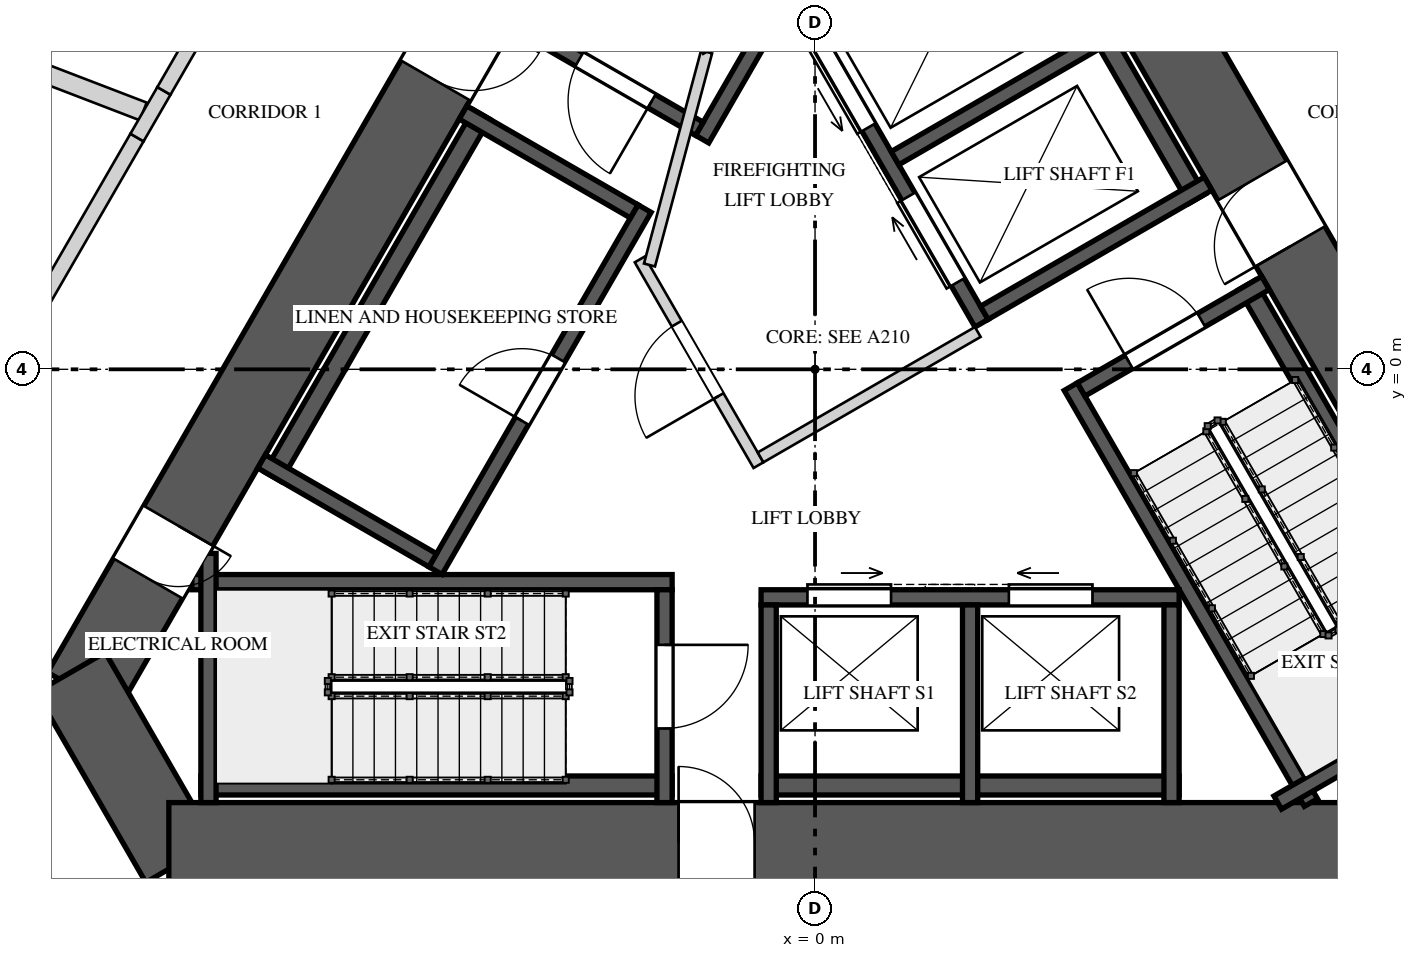
"""IFC4 building model, lengths in metres.
Left out: names, types, materials, properties, quantities, classifications, styles, units other than length and angle.
Written with IfcOpenShell. Run it as: python <this file> out.ifc"""

import sys

from ifc_helpers import new_model, si_unit, direction, frame, frame_2d, origin, place, context, subcontext, project, spatial, rectangle, extrude, element, fill, save


model = new_model("IFC4")
c1 = context("Model", 3, precision=1e-05, world=origin(), true_north=direction((0.0, 1.0)))
c2 = subcontext(c1, "Body", "Model", "MODEL_VIEW")
j1 = project(units=[si_unit("LENGTHUNIT", "METRE"), si_unit("PLANEANGLEUNIT", "RADIAN")], contexts=[c1])
p1 = place(None, origin())
s1 = spatial("IfcSite", under=j1, at=p1, CompositionType="ELEMENT")
p2 = place(p1, origin())
s2 = spatial("IfcBuilding", under=s1, at=p2, CompositionType="ELEMENT")
p3 = place(p2, frame((0.0, 0.0, 51.2)))
s3 = spatial("IfcBuildingStorey", under=s2, at=p3, CompositionType="ELEMENT", Elevation=51.2)
p4 = place(p3, frame((-1.14, 10.475, 0.0), z_axis=(0.0, 0.0, 1.0), x_axis=(-0.499985955615, -0.866033512162, 0.0)))
e1 = element("IfcWall", 1, at=p4, inside=s3, PredefinedType="SHEAR", context=c2, shape_type="SweptSolid", body=[
    extrude(rectangle(XDim=17.003, YDim=1.05, at=frame_2d((8.501, 0.0))), origin(), (0.0, 0.0, 1.0), 4.0),
])
p5 = place(p4, frame((6.707, 0.0, 0.0)))
e2 = element("IfcOpeningElement", 2, at=p5, cuts=e1, PredefinedType="OPENING", context=c2, shape_type="SweptSolid", body=[
    extrude(rectangle(XDim=1.0, YDim=2.4, at=frame_2d((0.5, 1.2))), frame((0.0, 0.535, 0.0), z_axis=(0.0, -1.0, 0.0), x_axis=(1.0, 0.0, 0.0)), (0.0, 0.0, 1.0), 1.07),
])
p6 = place(p4, frame((14.472, 0.0, 0.0)))
e3 = element("IfcOpeningElement", 3, at=p6, cuts=e1, PredefinedType="OPENING", context=c2, shape_type="SweptSolid", body=[
    extrude(rectangle(XDim=0.8, YDim=2.1, at=frame_2d((0.4, 1.05))), frame((0.0, 0.535, 0.0), z_axis=(0.0, -1.0, 0.0), x_axis=(1.0, 0.0, 0.0)), (0.0, 0.0, 1.0), 1.07),
])
p7 = place(p3, frame((-9.793, -3.988, 0.0), z_axis=(0.0, 0.0, 1.0), x_axis=(0.499995765644, -0.866027848477, 0.0)))
e4 = element("IfcWall", 4, at=p7, inside=s3, PredefinedType="SHEAR", context=c2, shape_type="SweptSolid", body=[
    extrude(rectangle(XDim=2.887, YDim=1.05, at=frame_2d((1.443, 0.0))), origin(), (0.0, 0.0, 1.0), 4.0),
])
p8 = place(p3, frame((-8.501, -6.225, 0.0), z_axis=(0.0, 0.0, 1.0), x_axis=(1.0, 0.0, 0.0)))
e5 = element("IfcWall", 5, at=p8, inside=s3, PredefinedType="SHEAR", context=c2, shape_type="SweptSolid", body=[
    extrude(rectangle(XDim=17.003, YDim=1.05, at=frame_2d((8.501, 0.0))), origin(), (0.0, 0.0, 1.0), 4.0),
])
p9 = place(p8, frame((6.707, 0.0, 0.0)))
e6 = element("IfcOpeningElement", 6, at=p9, cuts=e5, PredefinedType="OPENING", context=c2, shape_type="SweptSolid", body=[
    extrude(rectangle(XDim=1.0, YDim=2.4, at=frame_2d((0.5, 1.2))), frame((0.0, 0.535, 0.0), z_axis=(0.0, -1.0, 0.0), x_axis=(1.0, 0.0, 0.0)), (0.0, 0.0, 1.0), 1.07),
])
p10 = place(p3, frame((9.642, -4.25, 0.0), z_axis=(0.0, 0.0, 1.0), x_axis=(-0.499985955615, 0.866033512162, 0.0)))
e7 = element("IfcWall", 7, at=p10, inside=s3, PredefinedType="SHEAR", context=c2, shape_type="SweptSolid", body=[
    extrude(rectangle(XDim=17.003, YDim=1.05, at=frame_2d((8.501, 0.0))), origin(), (0.0, 0.0, 1.0), 4.0),
])
p11 = place(p10, frame((6.776, 0.0, 0.0)))
e8 = element("IfcOpeningElement", 8, at=p11, cuts=e7, PredefinedType="OPENING", context=c2, shape_type="SweptSolid", body=[
    extrude(rectangle(XDim=1.0, YDim=2.4, at=frame_2d((0.5, 1.2))), frame((0.0, 0.535, 0.0), z_axis=(0.0, -1.0, 0.0), x_axis=(1.0, 0.0, 0.0)), (0.0, 0.0, 1.0), 1.07),
])
p12 = place(p3, frame((1.674, 8.5, 0.0), z_axis=(0.0, 0.0, 1.0), x_axis=(-0.499995607161, -0.866027939976, 0.0)))
e9 = element("IfcWall", 9, at=p12, inside=s3, PredefinedType="SOLIDWALL", context=c2, shape_type="SweptSolid", body=[
    extrude(rectangle(XDim=6.318, YDim=0.2, at=frame_2d((3.159, 0.0))), origin(), (0.0, 0.0, 1.0), 3.65),
])
p13 = place(p3, frame((-1.521, 3.165, 0.0), z_axis=(0.0, 0.0, 1.0), x_axis=(-0.866034573852, 0.49998411664, 0.0)))
e10 = element("IfcWall", 10, at=p13, inside=s3, PredefinedType="SOLIDWALL", context=c2, shape_type="SweptSolid", body=[
    extrude(rectangle(XDim=2.8, YDim=0.2, at=frame_2d((1.4, 0.0))), origin(), (0.0, 0.0, 1.0), 3.65),
])
p14 = place(p13, frame((0.725, 0.0, 0.0)))
e11 = element("IfcOpeningElement", 11, at=p14, cuts=e10, PredefinedType="OPENING", context=c2, shape_type="SweptSolid", body=[
    extrude(rectangle(XDim=1.1, YDim=2.4, at=frame_2d((0.55, 1.2))), frame((0.0, 0.11, 0.0), z_axis=(0.0, -1.0, 0.0), x_axis=(1.0, 0.0, 0.0)), (0.0, 0.0, 1.0), 0.22),
])
p15 = place(p3, frame((-8.08, -5.475, 0.0), z_axis=(0.0, 0.0, 1.0), x_axis=(1.0, 0.0, 0.0)))
e12 = element("IfcWall", 12, at=p15, inside=s3, PredefinedType="SOLIDWALL", context=c2, shape_type="SweptSolid", body=[
    extrude(rectangle(XDim=6.2, YDim=0.25, at=frame_2d((3.1, 0.0))), origin(), (0.0, 0.0, 1.0), 3.65),
])
p16 = place(p3, frame((-8.198, -2.8, 0.0), z_axis=(0.0, 0.0, 1.0), x_axis=(1.0, 0.0, 0.0)))
e13 = element("IfcWall", 13, at=p16, inside=s3, PredefinedType="SOLIDWALL", context=c2, shape_type="SweptSolid", body=[
    extrude(rectangle(XDim=6.319, YDim=0.2, at=frame_2d((3.159, 0.0))), origin(), (0.0, 0.0, 1.0), 3.65),
])
p17 = place(p3, frame((-7.98, -2.422, 0.0), z_axis=(0.0, 0.0, 1.0), x_axis=(0.0, -1.0, 0.0)))
e14 = element("IfcWall", 14, at=p17, inside=s3, PredefinedType="SOLIDWALL", context=c2, shape_type="SweptSolid", body=[
    extrude(rectangle(XDim=3.278, YDim=0.2, at=frame_2d((1.639, 0.0))), origin(), (0.0, 0.0, 1.0), 3.65),
])
p18 = place(p3, frame((-1.98, -2.9, 0.0), z_axis=(0.0, 0.0, 1.0), x_axis=(0.0, -1.0, 0.0)))
e15 = element("IfcWall", 15, at=p18, inside=s3, PredefinedType="SOLIDWALL", context=c2, shape_type="SweptSolid", body=[
    extrude(rectangle(XDim=2.8, YDim=0.2, at=frame_2d((1.4, 0.0))), origin(), (0.0, 0.0, 1.0), 3.65),
])
p19 = place(p18, frame((0.725, 0.0, 0.0)))
e16 = element("IfcOpeningElement", 16, at=p19, cuts=e15, PredefinedType="OPENING", context=c2, shape_type="SweptSolid", body=[
    extrude(rectangle(XDim=1.1, YDim=2.4, at=frame_2d((0.55, 1.2))), frame((0.0, 0.11, 0.0), z_axis=(0.0, -1.0, 0.0), x_axis=(1.0, 0.0, 0.0)), (0.0, 0.0, 1.0), 0.22),
])
p20 = place(p3, frame((8.781, -4.26, 0.0), z_axis=(0.0, 0.0, 1.0), x_axis=(-0.500009909098, 0.866019682689, 0.0)))
e17 = element("IfcWall", 17, at=p20, inside=s3, PredefinedType="SOLIDWALL", context=c2, shape_type="SweptSolid", body=[
    extrude(rectangle(XDim=6.2, YDim=0.25, at=frame_2d((3.1, 0.0))), origin(), (0.0, 0.0, 1.0), 3.65),
])
p21 = place(p3, frame((6.524, -5.7, 0.0), z_axis=(0.0, 0.0, 1.0), x_axis=(-0.499995607161, 0.866027939976, 0.0)))
e18 = element("IfcWall", 18, at=p21, inside=s3, PredefinedType="SOLIDWALL", context=c2, shape_type="SweptSolid", body=[
    extrude(rectangle(XDim=6.318, YDim=0.2, at=frame_2d((3.159, 0.0))), origin(), (0.0, 0.0, 1.0), 3.65),
])
p22 = place(p3, frame((6.087, -5.7, 0.0), z_axis=(0.0, 0.0, 1.0), x_axis=(0.866006986733, 0.500031897912, 0.0)))
e19 = element("IfcWall", 19, at=p22, inside=s3, PredefinedType="SOLIDWALL", context=c2, shape_type="SweptSolid", body=[
    extrude(rectangle(XDim=3.278, YDim=0.2, at=frame_2d((1.639, 0.0))), origin(), (0.0, 0.0, 1.0), 3.65),
])
p23 = place(p3, frame((3.501, -0.265, 0.0), z_axis=(0.0, 0.0, 1.0), x_axis=(0.866034573852, 0.49998411664, 0.0)))
e20 = element("IfcWall", 20, at=p23, inside=s3, PredefinedType="SOLIDWALL", context=c2, shape_type="SweptSolid", body=[
    extrude(rectangle(XDim=2.8, YDim=0.2, at=frame_2d((1.4, 0.0))), origin(), (0.0, 0.0, 1.0), 3.65),
])
p24 = place(p23, frame((0.725, 0.0, 0.0)))
e21 = element("IfcOpeningElement", 21, at=p24, cuts=e20, PredefinedType="OPENING", context=c2, shape_type="SweptSolid", body=[
    extrude(rectangle(XDim=1.1, YDim=2.4, at=frame_2d((0.55, 1.2))), frame((0.0, 0.11, 0.0), z_axis=(0.0, -1.0, 0.0), x_axis=(1.0, 0.0, 0.0)), (0.0, 0.0, 1.0), 0.22),
])
p25 = place(p3, frame((-4.993, -2.648, 0.0), z_axis=(0.0, 0.0, 1.0), x_axis=(0.499996545922, 0.866027397988, 0.0)))
e22 = element("IfcWall", 22, at=p25, inside=s3, PredefinedType="SOLIDWALL", context=c2, shape_type="SweptSolid", body=[
    extrude(rectangle(XDim=5.5, YDim=0.2, at=frame_2d((2.75, 0.0))), origin(), (0.0, 0.0, 1.0), 3.65),
])
p26 = place(p25, frame((2.275, 0.0, 0.0)))
e23 = element("IfcOpeningElement", 23, at=p26, cuts=e22, PredefinedType="OPENING", context=c2, shape_type="SweptSolid", body=[
    extrude(rectangle(XDim=0.95, YDim=2.4, at=frame_2d((0.475, 1.2))), frame((0.0, 0.11, 0.0), z_axis=(0.0, -1.0, 0.0), x_axis=(1.0, 0.0, 0.0)), (0.0, 0.0, 1.0), 0.22),
])
p27 = place(p3, frame((-4.386, 3.352, 0.0), z_axis=(0.0, 0.0, 1.0), x_axis=(-0.500015767406, -0.866016300277, 0.0)))
e24 = element("IfcWall", 24, at=p27, inside=s3, PredefinedType="SOLIDWALL", context=c2, shape_type="SweptSolid", body=[
    extrude(rectangle(XDim=5.5, YDim=0.25, at=frame_2d((2.75, 0.0))), origin(), (0.0, 0.0, 1.0), 3.65),
])
for number, where, z_axis, x_axis in (
    (25, (-2.38, 2.078, 0.0), (0.0, 0.0, 1.0), (-0.866, 0.5, 0.0)),
    (26, (-5.03, -2.512, 0.0), (0.0, 0.0, 1.0), (-0.866, 0.5, 0.0)),
):
    element("IfcWall", number, at=place(p3, frame(where, z_axis=z_axis, x_axis=x_axis)), inside=s3, PredefinedType="SOLIDWALL", context=c2, shape_type="SweptSolid", body=[
        extrude(rectangle(XDim=2.6, YDim=0.2, at=frame_2d((1.3, 0.0))), origin(), (0.0, 0.0, 1.0), 3.65),
    ])
p28 = place(p3, frame((-0.71, -3.0, 0.0), z_axis=(0.0, 0.0, 1.0), x_axis=(1.0, 0.0, 0.0)))
e27 = element("IfcWall", 27, at=p28, inside=s3, PredefinedType="SOLIDWALL", context=c2, shape_type="SweptSolid", body=[
    extrude(rectangle(XDim=5.5, YDim=0.2, at=frame_2d((2.75, 0.0))), origin(), (0.0, 0.0, 1.0), 3.65),
])
p29 = place(p28, frame((0.61, 0.0, 0.0)))
e28 = element("IfcOpeningElement", 28, at=p29, cuts=e27, PredefinedType="OPENING", context=c2, shape_type="SweptSolid", body=[
    extrude(rectangle(XDim=1.1, YDim=2.1, at=frame_2d((0.55, 1.05))), frame((0.0, 0.11, 0.0), z_axis=(0.0, -1.0, 0.0), x_axis=(1.0, 0.0, 0.0)), (0.0, 0.0, 1.0), 0.22),
])
p30 = place(p28, frame((3.26, 0.0, 0.0)))
e29 = element("IfcOpeningElement", 29, at=p30, cuts=e27, PredefinedType="OPENING", context=c2, shape_type="SweptSolid", body=[
    extrude(rectangle(XDim=1.1, YDim=2.1, at=frame_2d((0.55, 1.05))), frame((0.0, 0.11, 0.0), z_axis=(0.0, -1.0, 0.0), x_axis=(1.0, 0.0, 0.0)), (0.0, 0.0, 1.0), 0.22),
])
p31 = place(p3, frame((-0.71, -5.475, 0.0), z_axis=(0.0, 0.0, 1.0), x_axis=(1.0, 0.0, 0.0)))
e30 = element("IfcWall", 30, at=p31, inside=s3, PredefinedType="SOLIDWALL", context=c2, shape_type="SweptSolid", body=[
    extrude(rectangle(XDim=5.5, YDim=0.25, at=frame_2d((2.75, 0.0))), origin(), (0.0, 0.0, 1.0), 3.65),
])
for number, where, z_axis, x_axis in (
    (31, (-0.61, -3.1, 0.0), (0.0, 0.0, 1.0), (0.0, -1.0, 0.0)),
    (32, (2.04, -3.1, 0.0), (0.0, 0.0, 1.0), (0.0, -1.0, 0.0)),
    (33, (4.69, -3.1, 0.0), (0.0, 0.0, 1.0), (0.0, -1.0, 0.0)),
):
    element("IfcWall", number, at=place(p3, frame(where, z_axis=z_axis, x_axis=x_axis)), inside=s3, PredefinedType="SOLIDWALL", context=c2, shape_type="SweptSolid", body=[
        extrude(rectangle(XDim=2.6, YDim=0.2, at=frame_2d((1.3, 0.0))), origin(), (0.0, 0.0, 1.0), 3.65),
    ])
p32 = place(p3, frame((2.19, 0.606, 0.0), z_axis=(0.0, 0.0, 1.0), x_axis=(-0.500002801628, 0.866023786258, 0.0)))
e34 = element("IfcWall", 34, at=p32, inside=s3, PredefinedType="SOLIDWALL", context=c2, shape_type="SweptSolid", body=[
    extrude(rectangle(XDim=4.9, YDim=0.2, at=frame_2d((2.45, 0.0))), origin(), (0.0, 0.0, 1.0), 3.65),
])
p33 = place(p32, frame((0.625, 0.0, 0.0)))
e35 = element("IfcOpeningElement", 35, at=p33, cuts=e34, PredefinedType="OPENING", context=c2, shape_type="SweptSolid", body=[
    extrude(rectangle(XDim=1.3, YDim=2.1, at=frame_2d((0.65, 1.05))), frame((0.0, 0.11, 0.0), z_axis=(0.0, -1.0, 0.0), x_axis=(1.0, 0.0, 0.0)), (0.0, 0.0, 1.0), 0.22),
])
p34 = place(p32, frame((2.975, 0.0, 0.0)))
e36 = element("IfcOpeningElement", 36, at=p34, cuts=e34, PredefinedType="OPENING", context=c2, shape_type="SweptSolid", body=[
    extrude(rectangle(XDim=1.3, YDim=2.1, at=frame_2d((0.65, 1.05))), frame((0.0, 0.11, 0.0), z_axis=(0.0, -1.0, 0.0), x_axis=(1.0, 0.0, 0.0)), (0.0, 0.0, 1.0), 0.22),
])
p35 = place(p3, frame((5.026, 2.244, 0.0), z_axis=(0.0, 0.0, 1.0), x_axis=(-0.500002801628, 0.866023786258, 0.0)))
e37 = element("IfcWall", 37, at=p35, inside=s3, PredefinedType="SOLIDWALL", context=c2, shape_type="SweptSolid", body=[
    extrude(rectangle(XDim=4.9, YDim=0.25, at=frame_2d((2.45, 0.0))), origin(), (0.0, 0.0, 1.0), 3.65),
])
for number, where, z_axis, x_axis in (
    (38, (2.227, 0.743, 0.0), (0.0, 0.0, 1.0), (0.866, 0.5, 0.0)),
    (39, (1.052, 2.778, 0.0), (0.0, 0.0, 1.0), (0.866, 0.5, 0.0)),
):
    element("IfcWall", number, at=place(p3, frame(where, z_axis=z_axis, x_axis=x_axis)), inside=s3, PredefinedType="SOLIDWALL", context=c2, shape_type="SweptSolid", body=[
        extrude(rectangle(XDim=3.4, YDim=0.2, at=frame_2d((1.7, 0.0))), origin(), (0.0, 0.0, 1.0), 3.65),
    ])
p36 = place(p3, frame((-0.744, -1.261, 0.0), z_axis=(0.0, 0.0, 1.0), x_axis=(-0.500004234368, 0.866022959057, 0.0)))
e40 = element("IfcWall", 40, at=p36, inside=s3, PredefinedType="PARTITIONING", context=c2, shape_type="SweptSolid", body=[
    extrude(rectangle(XDim=3.125, YDim=0.15, at=frame_2d((1.562, 0.0))), origin(), (0.0, 0.0, 1.0), 3.65),
])
p37 = place(p36, frame((1.05, 0.0, 0.0)))
e41 = element("IfcOpeningElement", 41, at=p37, cuts=e40, PredefinedType="OPENING", context=c2, shape_type="SweptSolid", body=[
    extrude(rectangle(XDim=1.1, YDim=2.4, at=frame_2d((0.55, 1.2))), frame((0.0, 0.085, 0.0), z_axis=(0.0, -1.0, 0.0), x_axis=(1.0, 0.0, 0.0)), (0.0, 0.0, 1.0), 0.17),
])
p38 = place(p3, frame((-0.717, -1.159, 0.0), z_axis=(0.0, 0.0, 1.0), x_axis=(0.866008176907, 0.50002983664, 0.0)))
e42 = element("IfcWall", 42, at=p38, inside=s3, PredefinedType="PARTITIONING", context=c2, shape_type="SweptSolid", body=[
    extrude(rectangle(XDim=3.3, YDim=0.15, at=frame_2d((1.65, 0.0))), origin(), (0.0, 0.0, 1.0), 3.65),
])
p39 = place(p3, frame((-2.178, 1.372, 0.0), z_axis=(0.0, 0.0, 1.0), x_axis=(0.258808958833, 0.96592852884, 0.0)))
e43 = element("IfcWall", 43, at=p39, inside=s3, PredefinedType="PARTITIONING", context=c2, shape_type="SweptSolid", body=[
    extrude(rectangle(XDim=2.903, YDim=0.15, at=frame_2d((1.451, 0.0))), origin(), (0.0, 0.0, 1.0), 3.65),
])
p40 = place(p3, frame((-1.51, 4.215, 0.0), z_axis=(0.0, 0.0, 1.0), x_axis=(0.866085525409, 0.49989585183, 0.0)))
e44 = element("IfcWall", 44, at=p40, inside=s3, PredefinedType="PARTITIONING", context=c2, shape_type="SweptSolid", body=[
    extrude(rectangle(XDim=1.3, YDim=0.15, at=frame_2d((0.65, 0.0))), origin(), (0.0, 0.0, 1.0), 3.65),
])
p41 = place(p3, frame((-8.838, 3.393, 0.0), z_axis=(0.0, 0.0, 1.0), x_axis=(-0.933575960916, 0.358379582566, 0.0)))
e45 = element("IfcWall", 45, at=p41, inside=s3, PredefinedType="SOLIDWALL", context=c2, shape_type="SweptSolid", body=[
    extrude(rectangle(XDim=8.133, YDim=0.25, at=frame_2d((4.067, 0.0))), origin(), (0.0, 0.0, 1.0), 2.95),
])
p42 = place(p3, frame((-11.049, -0.637, 0.0), z_axis=(0.0, 0.0, 1.0), x_axis=(0.500000470374, 0.866025132214, 0.0)))
e46 = element("IfcWall", 46, at=p42, inside=s3, PredefinedType="SOLIDWALL", context=c2, shape_type="SweptSolid", body=[
    extrude(rectangle(XDim=4.257, YDim=0.2, at=frame_2d((2.128, 0.0))), origin(), (0.0, 0.0, 1.0), 3.65),
])
p43 = place(p3, frame((-8.92, 3.049, 0.0), z_axis=(0.0, 0.0, 1.0), x_axis=(0.499881507708, 0.866093804534, 0.0)))
e47 = element("IfcWall", 47, at=p43, inside=s3, PredefinedType="SOLIDWALL", context=c2, shape_type="SweptSolid", body=[
    extrude(rectangle(XDim=0.709, YDim=0.2, at=frame_2d((0.354, 0.0))), origin(), (0.0, 0.0, 1.0), 2.95),
])
p44 = place(p3, frame((-8.566, 3.663, 0.0), z_axis=(0.0, 0.0, 1.0), x_axis=(0.500013241293, 0.866017758786, 0.0)))
e48 = element("IfcWall", 48, at=p44, inside=s3, PredefinedType="SOLIDWALL", context=c2, shape_type="SweptSolid", body=[
    extrude(rectangle(XDim=3.585, YDim=0.2, at=frame_2d((1.793, 0.0))), origin(), (0.0, 0.0, 1.0), 3.65),
])
p45 = place(p14, origin())
e49 = element("IfcDoor", 49, at=p45, inside=s3, OperationType="SINGLE_SWING_RIGHT", PredefinedType="DOOR", context=c2, shape_type="SweptSolid", body=[
    extrude(rectangle(XDim=1.1, YDim=2.4, at=frame_2d((0.55, 1.2))), frame((0.0, 0.025, 0.0), z_axis=(0.0, -1.0, 0.0), x_axis=(1.0, 0.0, 0.0)), (0.0, 0.0, 1.0), 0.05),
])
fill(e11, e49)
p46 = place(p19, origin())
e50 = element("IfcDoor", 50, at=p46, inside=s3, OperationType="SINGLE_SWING_LEFT", PredefinedType="DOOR", context=c2, shape_type="SweptSolid", body=[
    extrude(rectangle(XDim=1.1, YDim=2.4, at=frame_2d((0.55, 1.2))), frame((0.0, 0.025, 0.0), z_axis=(0.0, -1.0, 0.0), x_axis=(1.0, 0.0, 0.0)), (0.0, 0.0, 1.0), 0.05),
])
fill(e16, e50)
p47 = place(p24, origin())
e51 = element("IfcDoor", 51, at=p47, inside=s3, OperationType="SINGLE_SWING_RIGHT", PredefinedType="DOOR", context=c2, shape_type="SweptSolid", body=[
    extrude(rectangle(XDim=1.1, YDim=2.4, at=frame_2d((0.55, 1.2))), frame((0.0, 0.025, 0.0), z_axis=(0.0, -1.0, 0.0), x_axis=(1.0, 0.0, 0.0)), (0.0, 0.0, 1.0), 0.05),
])
fill(e21, e51)
p48 = place(p26, origin())
e52 = element("IfcDoor", 52, at=p48, inside=s3, OperationType="SINGLE_SWING_LEFT", PredefinedType="DOOR", context=c2, shape_type="SweptSolid", body=[
    extrude(rectangle(XDim=0.95, YDim=2.4, at=frame_2d((0.475, 1.2))), frame((0.0, 0.025, 0.0), z_axis=(0.0, -1.0, 0.0), x_axis=(1.0, 0.0, 0.0)), (0.0, 0.0, 1.0), 0.05),
])
fill(e23, e52)
p49 = place(p29, origin())
e53 = element("IfcDoor", 53, at=p49, inside=s3, OperationType="SLIDING_TO_RIGHT", PredefinedType="DOOR", context=c2, shape_type="SweptSolid", body=[
    extrude(rectangle(XDim=1.1, YDim=2.1, at=frame_2d((0.55, 1.05))), frame((0.0, 0.025, 0.0), z_axis=(0.0, -1.0, 0.0), x_axis=(1.0, 0.0, 0.0)), (0.0, 0.0, 1.0), 0.05),
])
fill(e28, e53)
p50 = place(p30, origin())
e54 = element("IfcDoor", 54, at=p50, inside=s3, OperationType="SLIDING_TO_LEFT", PredefinedType="DOOR", context=c2, shape_type="SweptSolid", body=[
    extrude(rectangle(XDim=1.1, YDim=2.1, at=frame_2d((0.55, 1.05))), frame((0.0, 0.025, 0.0), z_axis=(0.0, -1.0, 0.0), x_axis=(1.0, 0.0, 0.0)), (0.0, 0.0, 1.0), 0.05),
])
fill(e29, e54)
p51 = place(p33, origin())
e55 = element("IfcDoor", 55, at=p51, inside=s3, OperationType="SLIDING_TO_RIGHT", PredefinedType="DOOR", context=c2, shape_type="SweptSolid", body=[
    extrude(rectangle(XDim=1.3, YDim=2.1, at=frame_2d((0.65, 1.05))), frame((0.0, 0.025, 0.0), z_axis=(0.0, -1.0, 0.0), x_axis=(1.0, 0.0, 0.0)), (0.0, 0.0, 1.0), 0.05),
])
fill(e35, e55)
p52 = place(p34, origin())
e56 = element("IfcDoor", 56, at=p52, inside=s3, OperationType="SLIDING_TO_LEFT", PredefinedType="DOOR", context=c2, shape_type="SweptSolid", body=[
    extrude(rectangle(XDim=1.3, YDim=2.1, at=frame_2d((0.65, 1.05))), frame((0.0, 0.025, 0.0), z_axis=(0.0, -1.0, 0.0), x_axis=(1.0, 0.0, 0.0)), (0.0, 0.0, 1.0), 0.05),
])
fill(e36, e56)
p53 = place(p37, origin())
e57 = element("IfcDoor", 57, at=p53, inside=s3, OperationType="SINGLE_SWING_RIGHT", PredefinedType="DOOR", context=c2, shape_type="SweptSolid", body=[
    extrude(rectangle(XDim=1.1, YDim=2.4, at=frame_2d((0.55, 1.2))), frame((0.0, 0.025, 0.0), z_axis=(0.0, -1.0, 0.0), x_axis=(1.0, 0.0, 0.0)), (0.0, 0.0, 1.0), 0.05),
])
fill(e41, e57)
p54 = place(p5, origin())
e58 = element("IfcDoor", 58, at=p54, inside=s3, OperationType="SINGLE_SWING_LEFT", PredefinedType="DOOR", context=c2, shape_type="SweptSolid", body=[
    extrude(rectangle(XDim=1.0, YDim=2.4, at=frame_2d((0.5, 1.2))), frame((0.0, 0.025, 0.0), z_axis=(0.0, -1.0, 0.0), x_axis=(1.0, 0.0, 0.0)), (0.0, 0.0, 1.0), 0.05),
])
fill(e2, e58)
p55 = place(p9, origin())
e59 = element("IfcDoor", 59, at=p55, inside=s3, OperationType="SINGLE_SWING_RIGHT", PredefinedType="DOOR", context=c2, shape_type="SweptSolid", body=[
    extrude(rectangle(XDim=1.0, YDim=2.4, at=frame_2d((0.5, 1.2))), frame((0.0, 0.025, 0.0), z_axis=(0.0, -1.0, 0.0), x_axis=(1.0, 0.0, 0.0)), (0.0, 0.0, 1.0), 0.05),
])
fill(e6, e59)
p56 = place(p11, origin())
e60 = element("IfcDoor", 60, at=p56, inside=s3, OperationType="SINGLE_SWING_LEFT", PredefinedType="DOOR", context=c2, shape_type="SweptSolid", body=[
    extrude(rectangle(XDim=1.0, YDim=2.4, at=frame_2d((0.5, 1.2))), frame((0.0, 0.025, 0.0), z_axis=(0.0, -1.0, 0.0), x_axis=(1.0, 0.0, 0.0)), (0.0, 0.0, 1.0), 0.05),
])
fill(e8, e60)
p57 = place(p6, origin())
e61 = element("IfcDoor", 61, at=p57, inside=s3, OperationType="SINGLE_SWING_RIGHT", PredefinedType="DOOR", context=c2, shape_type="SweptSolid", body=[
    extrude(rectangle(XDim=0.8, YDim=2.1, at=frame_2d((0.4, 1.05))), frame((0.0, 0.025, 0.0), z_axis=(0.0, -1.0, 0.0), x_axis=(1.0, 0.0, 0.0)), (0.0, 0.0, 1.0), 0.05),
])
fill(e3, e61)
save(model, sys.argv[1])
